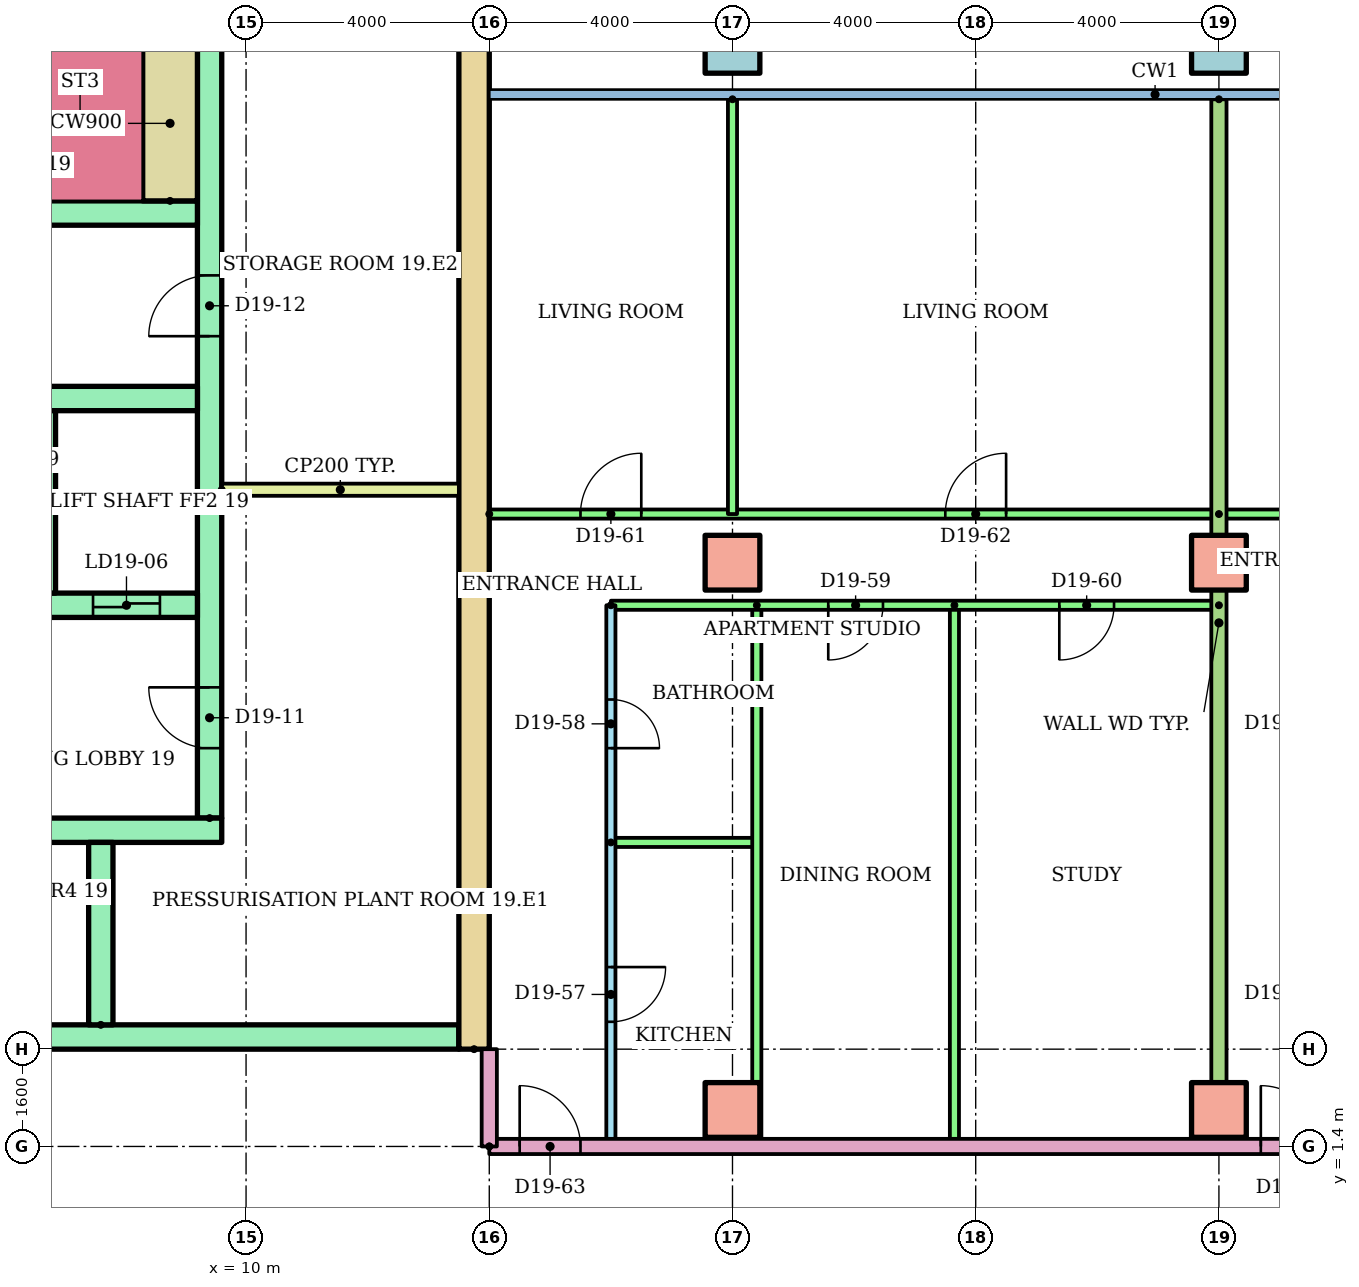
"""IFC4 building model, lengths in metres.
Left out: names, types, materials, properties, quantities, classifications, styles, units other than length and angle.
Written with IfcOpenShell. Run it as: python <this file> out.ifc"""

import sys

from ifc_helpers import new_model, si_unit, direction, frame, frame_2d, origin, origin_2d, place, context, subcontext, project, spatial, rectangle, hollow_rectangle, extrude, element, fill, save


model = new_model("IFC4")
c1 = context("Model", 3, precision=1e-05, world=origin(), true_north=direction((0.0, 1.0)))
c2 = subcontext(c1, "Body", "Model", "MODEL_VIEW")
j1 = project(units=[si_unit("LENGTHUNIT", "METRE"), si_unit("PLANEANGLEUNIT", "RADIAN")], contexts=[c1])
p1 = place(None, origin())
s1 = spatial("IfcSite", under=j1, at=p1, CompositionType="ELEMENT")
p2 = place(p1, origin())
s2 = spatial("IfcBuilding", under=s1, at=p2, CompositionType="ELEMENT")
p3 = place(p2, frame((0.0, 0.0, 77.5)))
s3 = spatial("IfcBuildingStorey", under=s2, at=p3, CompositionType="ELEMENT", Elevation=77.5)
for number, where in (
    (1, (18.0, 2.0, 0.0)),
    (2, (26.0, 2.0, 0.0)),
    (3, (18.0, 11.0, 0.0)),
    (4, (26.0, 11.0, 0.0)),
):
    element("IfcColumn", number, at=place(p3, frame(where)), inside=s3, PredefinedType="COLUMN", context=c2, shape_type="SweptSolid", body=[
        extrude(rectangle(XDim=0.9, YDim=0.9, at=origin_2d()), origin(), (0.0, 0.0, 1.0), 3.2),
    ])
for number, where in (
    (5, (18.0, 19.5, 0.0)),
    (6, (26.0, 19.5, 0.0)),
):
    element("IfcColumn", number, at=place(p3, frame(where)), inside=s3, PredefinedType="COLUMN", context=c2, shape_type="SweptSolid", body=[
        extrude(hollow_rectangle(XDim=0.9, YDim=0.9, WallThickness=0.045, at=origin_2d()), origin(), (0.0, 0.0, 1.0), 3.2),
    ])
p4 = place(p3, frame((13.75, 3.0, 0.0), z_axis=(0.0, 0.0, 1.0), x_axis=(0.0, 1.0, 0.0)))
e7 = element("IfcWall", 7, at=p4, inside=s3, PredefinedType="SHEAR", context=c2, shape_type="SweptSolid", body=[
    extrude(rectangle(XDim=17.0, YDim=0.5, at=frame_2d((8.5, 0.0))), origin(), (0.0, 0.0, 1.0), 2.92),
])
p5 = place(p3, frame((9.4, 6.8, 0.0), z_axis=(0.0, 0.0, 1.0), x_axis=(0.0, 1.0, 0.0)))
e8 = element("IfcWall", 8, at=p5, inside=s3, PredefinedType="SHEAR", context=c2, shape_type="SweptSolid", body=[
    extrude(rectangle(XDim=12.7, YDim=0.4, at=frame_2d((6.35, 0.0))), origin(), (0.0, 0.0, 1.0), 2.92),
])
p6 = place(p5, frame((1.15, 0.0, 0.0)))
e9 = element("IfcOpeningElement", 9, at=p6, cuts=e8, PredefinedType="OPENING", context=c2, shape_type="SweptSolid", body=[
    extrude(rectangle(XDim=1.0, YDim=2.1, at=frame_2d((0.5, 1.05))), frame((0.0, 0.21, 0.0), z_axis=(0.0, -1.0, 0.0), x_axis=(1.0, 0.0, 0.0)), (0.0, 0.0, 1.0), 0.42),
])
p7 = place(p5, frame((7.925, 0.0, 0.0)))
e10 = element("IfcOpeningElement", 10, at=p7, cuts=e8, PredefinedType="OPENING", context=c2, shape_type="SweptSolid", body=[
    extrude(rectangle(XDim=1.0, YDim=2.1, at=frame_2d((0.5, 1.05))), frame((0.0, 0.21, 0.0), z_axis=(0.0, -1.0, 0.0), x_axis=(1.0, 0.0, 0.0)), (0.0, 0.0, 1.0), 0.42),
])
p8 = place(p3, frame((-13.5, 3.2, 0.0)))
e11 = element("IfcWall", 11, at=p8, inside=s3, PredefinedType="SHEAR", context=c2, shape_type="SweptSolid", body=[
    extrude(rectangle(XDim=27.0, YDim=0.4, at=frame_2d((13.5, 0.0))), origin(), (0.0, 0.0, 1.0), 2.92),
])
p9 = place(p8, frame((6.861, 0.0, 0.0)))
e12 = element("IfcOpeningElement", 12, at=p9, cuts=e11, PredefinedType="OPENING", context=c2, shape_type="SweptSolid", body=[
    extrude(rectangle(XDim=1.1, YDim=2.1, at=frame_2d((0.55, 1.05))), frame((0.0, 0.21, 0.0), z_axis=(0.0, -1.0, 0.0), x_axis=(1.0, 0.0, 0.0)), (0.0, 0.0, 1.0), 0.42),
])
p10 = place(p8, frame((9.906, 0.0, 0.0)))
e13 = element("IfcOpeningElement", 13, at=p10, cuts=e11, PredefinedType="OPENING", context=c2, shape_type="SweptSolid", body=[
    extrude(rectangle(XDim=1.1, YDim=2.1, at=frame_2d((0.55, 1.05))), frame((0.0, 0.21, 0.0), z_axis=(0.0, -1.0, 0.0), x_axis=(1.0, 0.0, 0.0)), (0.0, 0.0, 1.0), 0.42),
])
p11 = place(p8, frame((15.994, 0.0, 0.0)))
e14 = element("IfcOpeningElement", 14, at=p11, cuts=e11, PredefinedType="OPENING", context=c2, shape_type="SweptSolid", body=[
    extrude(rectangle(XDim=1.1, YDim=2.1, at=frame_2d((0.55, 1.05))), frame((0.0, 0.21, 0.0), z_axis=(0.0, -1.0, 0.0), x_axis=(1.0, 0.0, 0.0)), (0.0, 0.0, 1.0), 0.42),
])
p12 = place(p8, frame((19.039, 0.0, 0.0)))
e15 = element("IfcOpeningElement", 15, at=p12, cuts=e11, PredefinedType="OPENING", context=c2, shape_type="SweptSolid", body=[
    extrude(rectangle(XDim=1.1, YDim=2.1, at=frame_2d((0.55, 1.05))), frame((0.0, 0.21, 0.0), z_axis=(0.0, -1.0, 0.0), x_axis=(1.0, 0.0, 0.0)), (0.0, 0.0, 1.0), 0.42),
])
p13 = place(p8, frame((12.6, 0.0, 0.0)))
e16 = element("IfcOpeningElement", 16, at=p13, cuts=e11, PredefinedType="OPENING", context=c2, shape_type="SweptSolid", body=[
    extrude(rectangle(XDim=1.8, YDim=2.1, at=frame_2d((0.9, 1.05))), frame((0.0, 0.21, 0.0), z_axis=(0.0, -1.0, 0.0), x_axis=(1.0, 0.0, 0.0)), (0.0, 0.0, 1.0), 0.42),
])
p14 = place(p3, frame((1.522, 6.6, 0.0)))
e17 = element("IfcWall", 17, at=p14, inside=s3, PredefinedType="SHEAR", context=c2, shape_type="SweptSolid", body=[
    extrude(rectangle(XDim=8.078, YDim=0.4, at=frame_2d((4.039, 0.0))), origin(), (0.0, 0.0, 1.0), 2.92),
])
p15 = place(p3, frame((7.611, 3.4, 0.0), z_axis=(0.0, 0.0, 1.0), x_axis=(0.0, 1.0, 0.0)))
e18 = element("IfcWall", 18, at=p15, inside=s3, PredefinedType="SHEAR", context=c2, shape_type="SweptSolid", body=[
    extrude(rectangle(XDim=3.0, YDim=0.4, at=frame_2d((1.5, 0.0))), origin(), (0.0, 0.0, 1.0), 2.92),
])
p16 = place(p3, frame((1.2, 10.3, 0.0)))
e19 = element("IfcWall", 19, at=p16, inside=s3, PredefinedType="SHEAR", context=c2, shape_type="SweptSolid", body=[
    extrude(rectangle(XDim=8.0, YDim=0.4, at=frame_2d((4.0, 0.0))), origin(), (0.0, 0.0, 1.0), 2.92),
])
p17 = place(p16, frame((3.55, 0.0, 0.0)))
e20 = element("IfcOpeningElement", 20, at=p17, cuts=e19, PredefinedType="OPENING", context=c2, shape_type="SweptSolid", body=[
    extrude(rectangle(XDim=1.1, YDim=2.1, at=frame_2d((0.55, 1.05))), frame((0.0, 0.21, 0.0), z_axis=(0.0, -1.0, 0.0), x_axis=(1.0, 0.0, 0.0)), (0.0, 0.0, 1.0), 0.42),
])
p18 = place(p16, frame((6.283, 0.0, 0.0)))
e21 = element("IfcOpeningElement", 21, at=p18, cuts=e19, PredefinedType="OPENING", context=c2, shape_type="SweptSolid", body=[
    extrude(rectangle(XDim=1.1, YDim=2.1, at=frame_2d((0.55, 1.05))), frame((0.0, 0.21, 0.0), z_axis=(0.0, -1.0, 0.0), x_axis=(1.0, 0.0, 0.0)), (0.0, 0.0, 1.0), 0.42),
])
p19 = place(p16, frame((0.867, 0.0, 0.0)))
e22 = element("IfcOpeningElement", 22, at=p19, cuts=e19, PredefinedType="OPENING", context=c2, shape_type="SweptSolid", body=[
    extrude(rectangle(XDim=1.0, YDim=2.1, at=frame_2d((0.5, 1.05))), frame((0.0, 0.21, 0.0), z_axis=(0.0, -1.0, 0.0), x_axis=(1.0, 0.0, 0.0)), (0.0, 0.0, 1.0), 0.42),
])
p20 = place(p3, frame((1.2, 13.7, 0.0)))
e23 = element("IfcWall", 23, at=p20, inside=s3, PredefinedType="SHEAR", context=c2, shape_type="SweptSolid", body=[
    extrude(rectangle(XDim=8.0, YDim=0.4, at=frame_2d((4.0, 0.0))), origin(), (0.0, 0.0, 1.0), 2.92),
])
p21 = place(p3, frame((6.667, 10.5, 0.0), z_axis=(0.0, 0.0, 1.0), x_axis=(0.0, 1.0, 0.0)))
e24 = element("IfcWall", 24, at=p21, inside=s3, PredefinedType="SHEAR", context=c2, shape_type="SweptSolid", body=[
    extrude(rectangle(XDim=3.0, YDim=0.4, at=frame_2d((1.5, 0.0))), origin(), (0.0, 0.0, 1.0), 2.92),
])
p22 = place(p3, frame((-9.2, 16.75, 0.0)))
e25 = element("IfcWall", 25, at=p22, inside=s3, PredefinedType="SHEAR", context=c2, shape_type="SweptSolid", body=[
    extrude(rectangle(XDim=18.4, YDim=0.4, at=frame_2d((9.2, 0.0))), origin(), (0.0, 0.0, 1.0), 2.92),
])
p23 = place(p22, frame((0.1, 0.0, 0.0)))
e26 = element("IfcOpeningElement", 26, at=p23, cuts=e25, PredefinedType="OPENING", context=c2, shape_type="SweptSolid", body=[
    extrude(rectangle(XDim=0.95, YDim=2.1, at=frame_2d((0.475, 1.05))), frame((0.0, 0.21, 0.0), z_axis=(0.0, -1.0, 0.0), x_axis=(1.0, 0.0, 0.0)), (0.0, 0.0, 1.0), 0.42),
])
p24 = place(p22, frame((6.1, 0.0, 0.0)))
e27 = element("IfcOpeningElement", 27, at=p24, cuts=e25, PredefinedType="OPENING", context=c2, shape_type="SweptSolid", body=[
    extrude(rectangle(XDim=0.95, YDim=2.1, at=frame_2d((0.475, 1.05))), frame((0.0, 0.21, 0.0), z_axis=(0.0, -1.0, 0.0), x_axis=(1.0, 0.0, 0.0)), (0.0, 0.0, 1.0), 0.42),
])
p25 = place(p22, frame((12.1, 0.0, 0.0)))
e28 = element("IfcOpeningElement", 28, at=p25, cuts=e25, PredefinedType="OPENING", context=c2, shape_type="SweptSolid", body=[
    extrude(rectangle(XDim=0.95, YDim=2.1, at=frame_2d((0.475, 1.05))), frame((0.0, 0.21, 0.0), z_axis=(0.0, -1.0, 0.0), x_axis=(1.0, 0.0, 0.0)), (0.0, 0.0, 1.0), 0.42),
])
p26 = place(p3, frame((8.75, 16.95, 0.0), z_axis=(0.0, 0.0, 1.0), x_axis=(0.0, 1.0, 0.0)))
e29 = element("IfcWall", 29, at=p26, inside=s3, PredefinedType="SHEAR", context=c2, shape_type="SweptSolid", body=[
    extrude(rectangle(XDim=2.55, YDim=0.9, at=frame_2d((1.275, 0.0))), origin(), (0.0, 0.0, 1.0), 2.92),
])
p27 = place(p3, frame((9.6, 12.2, 0.0)))
e30 = element("IfcWall", 30, at=p27, inside=s3, PredefinedType="PARTITIONING", context=c2, shape_type="SweptSolid", body=[
    extrude(rectangle(XDim=3.9, YDim=0.2, at=frame_2d((1.95, 0.0))), origin(), (0.0, 0.0, 1.0), 2.92),
])
p28 = place(p3, frame((16.0, 10.3, 0.0), z_axis=(0.0, 0.0, 1.0), x_axis=(0.0, -1.0, 0.0)))
e31 = element("IfcWall", 31, at=p28, inside=s3, PredefinedType="PARTITIONING", context=c2, shape_type="SweptSolid", body=[
    extrude(rectangle(XDim=8.9, YDim=0.15, at=frame_2d((4.45, 0.0))), origin(), (0.0, 0.0, 1.0), 2.4),
])
p29 = place(p28, frame((5.95, 0.0, 0.0)))
e32 = element("IfcOpeningElement", 32, at=p29, cuts=e31, PredefinedType="OPENING", context=c2, shape_type="SweptSolid", body=[
    extrude(rectangle(XDim=0.9, YDim=2.1, at=frame_2d((0.45, 1.05))), frame((0.0, 0.085, 0.0), z_axis=(0.0, -1.0, 0.0), x_axis=(1.0, 0.0, 0.0)), (0.0, 0.0, 1.0), 0.17),
])
p30 = place(p28, frame((1.55, 0.0, 0.0)))
e33 = element("IfcOpeningElement", 33, at=p30, cuts=e31, PredefinedType="OPENING", context=c2, shape_type="SweptSolid", body=[
    extrude(rectangle(XDim=0.8, YDim=2.1, at=frame_2d((0.4, 1.05))), frame((0.0, 0.085, 0.0), z_axis=(0.0, -1.0, 0.0), x_axis=(1.0, 0.0, 0.0)), (0.0, 0.0, 1.0), 0.17),
])
p31 = place(p3, frame((16.0, 6.4, 0.0)))
e34 = element("IfcWall", 34, at=p31, inside=s3, PredefinedType="PARTITIONING", context=c2, shape_type="SweptSolid", body=[
    extrude(rectangle(XDim=2.4, YDim=0.15, at=frame_2d((1.2, 0.0))), origin(), (0.0, 0.0, 1.0), 2.4),
])
for number, where, z_axis, x_axis in (
    (35, (18.4, 10.3, 0.0), (0.0, 0.0, 1.0), (0.0, -1.0, 0.0)),
    (36, (21.65, 10.3, 0.0), (0.0, 0.0, 1.0), (0.0, -1.0, 0.0)),
):
    element("IfcWall", number, at=place(p3, frame(where, z_axis=z_axis, x_axis=x_axis)), inside=s3, PredefinedType="PARTITIONING", context=c2, shape_type="SweptSolid", body=[
        extrude(rectangle(XDim=8.9, YDim=0.15, at=frame_2d((4.45, 0.0))), origin(), (0.0, 0.0, 1.0), 2.4),
    ])
p32 = place(p3, frame((26.0, 10.3, 0.0), z_axis=(0.0, 0.0, 1.0), x_axis=(-1.0, 0.0, 0.0)))
e37 = element("IfcWall", 37, at=p32, inside=s3, PredefinedType="PARTITIONING", context=c2, shape_type="SweptSolid", body=[
    extrude(rectangle(XDim=10.0, YDim=0.15, at=frame_2d((5.0, 0.0))), origin(), (0.0, 0.0, 1.0), 2.4),
])
p33 = place(p32, frame((5.525, 0.0, 0.0)))
e38 = element("IfcOpeningElement", 38, at=p33, cuts=e37, PredefinedType="OPENING", context=c2, shape_type="SweptSolid", body=[
    extrude(rectangle(XDim=0.9, YDim=2.1, at=frame_2d((0.45, 1.05))), frame((0.0, 0.085, 0.0), z_axis=(0.0, -1.0, 0.0), x_axis=(1.0, 0.0, 0.0)), (0.0, 0.0, 1.0), 0.17),
])
p34 = place(p32, frame((1.725, 0.0, 0.0)))
e39 = element("IfcOpeningElement", 39, at=p34, cuts=e37, PredefinedType="OPENING", context=c2, shape_type="SweptSolid", body=[
    extrude(rectangle(XDim=0.9, YDim=2.1, at=frame_2d((0.45, 1.05))), frame((0.0, 0.085, 0.0), z_axis=(0.0, -1.0, 0.0), x_axis=(1.0, 0.0, 0.0)), (0.0, 0.0, 1.0), 0.17),
])
p35 = place(p3, frame((14.0, 11.8, 0.0)))
e40 = element("IfcWall", 40, at=p35, inside=s3, PredefinedType="PARTITIONING", context=c2, shape_type="SweptSolid", body=[
    extrude(rectangle(XDim=12.0, YDim=0.15, at=frame_2d((6.0, 0.0))), origin(), (0.0, 0.0, 1.0), 2.4),
])
p36 = place(p35, frame((1.5, 0.0, 0.0)))
e41 = element("IfcOpeningElement", 41, at=p36, cuts=e40, PredefinedType="OPENING", context=c2, shape_type="SweptSolid", body=[
    extrude(rectangle(XDim=1.0, YDim=2.1, at=frame_2d((0.5, 1.05))), frame((0.0, 0.085, 0.0), z_axis=(0.0, -1.0, 0.0), x_axis=(1.0, 0.0, 0.0)), (0.0, 0.0, 1.0), 0.17),
])
p37 = place(p35, frame((7.5, 0.0, 0.0)))
e42 = element("IfcOpeningElement", 42, at=p37, cuts=e40, PredefinedType="OPENING", context=c2, shape_type="SweptSolid", body=[
    extrude(rectangle(XDim=1.0, YDim=2.1, at=frame_2d((0.5, 1.05))), frame((0.0, 0.085, 0.0), z_axis=(0.0, -1.0, 0.0), x_axis=(1.0, 0.0, 0.0)), (0.0, 0.0, 1.0), 0.17),
])
p38 = place(p3, frame((18.0, 18.621, 0.0), z_axis=(0.0, 0.0, 1.0), x_axis=(0.0, -1.0, 0.0)))
e43 = element("IfcWall", 43, at=p38, inside=s3, PredefinedType="PARTITIONING", context=c2, shape_type="SweptSolid", body=[
    extrude(rectangle(XDim=6.821, YDim=0.15, at=frame_2d((3.411, 0.0))), origin(), (0.0, 0.0, 1.0), 2.4),
])
p39 = place(p3, frame((26.0, 11.8, 0.0)))
e44 = element("IfcWall", 44, at=p39, inside=s3, PredefinedType="PARTITIONING", context=c2, shape_type="SweptSolid", body=[
    extrude(rectangle(XDim=14.62, YDim=0.15, at=frame_2d((7.31, 0.0))), origin(), (0.0, 0.0, 1.0), 2.4),
])
p40 = place(p39, frame((3.5, 0.0, 0.0)))
e45 = element("IfcOpeningElement", 45, at=p40, cuts=e44, PredefinedType="OPENING", context=c2, shape_type="SweptSolid", body=[
    extrude(rectangle(XDim=1.0, YDim=2.1, at=frame_2d((0.5, 1.05))), frame((0.0, 0.085, 0.0), z_axis=(0.0, -1.0, 0.0), x_axis=(1.0, 0.0, 0.0)), (0.0, 0.0, 1.0), 0.17),
])
p41 = place(p39, frame((10.7, 0.0, 0.0)))
e46 = element("IfcOpeningElement", 46, at=p41, cuts=e44, PredefinedType="OPENING", context=c2, shape_type="SweptSolid", body=[
    extrude(rectangle(XDim=1.0, YDim=2.1, at=frame_2d((0.5, 1.05))), frame((0.0, 0.085, 0.0), z_axis=(0.0, -1.0, 0.0), x_axis=(1.0, 0.0, 0.0)), (0.0, 0.0, 1.0), 0.17),
])
p42 = place(p3, frame((26.0, 18.621, 0.0), z_axis=(0.0, 0.0, 1.0), x_axis=(0.0, -1.0, 0.0)))
e47 = element("IfcWall", 47, at=p42, inside=s3, PredefinedType="PARTITIONING", context=c2, shape_type="SweptSolid", body=[
    extrude(rectangle(XDim=17.221, YDim=0.25, at=frame_2d((8.611, 0.0))), origin(), (0.0, 0.0, 1.0), 2.4),
])
p43 = place(p3, frame((14.0, 1.4, 0.0)))
e48 = element("IfcWall", 48, at=p43, inside=s3, PredefinedType="PARTITIONING", context=c2, shape_type="SweptSolid", body=[
    extrude(rectangle(XDim=15.0, YDim=0.25, at=frame_2d((7.5, 0.0))), origin(), (0.0, 0.0, 1.0), 2.4),
])
p44 = place(p43, frame((0.5, 0.0, 0.0)))
e49 = element("IfcOpeningElement", 49, at=p44, cuts=e48, PredefinedType="OPENING", context=c2, shape_type="SweptSolid", body=[
    extrude(rectangle(XDim=1.0, YDim=2.1, at=frame_2d((0.5, 1.05))), frame((0.0, 0.135, 0.0), z_axis=(0.0, -1.0, 0.0), x_axis=(1.0, 0.0, 0.0)), (0.0, 0.0, 1.0), 0.27),
])
p45 = place(p43, frame((12.689, 0.0, 0.0)))
e50 = element("IfcOpeningElement", 50, at=p45, cuts=e48, PredefinedType="OPENING", context=c2, shape_type="SweptSolid", body=[
    extrude(rectangle(XDim=1.0, YDim=2.1, at=frame_2d((0.5, 1.05))), frame((0.0, 0.135, 0.0), z_axis=(0.0, -1.0, 0.0), x_axis=(1.0, 0.0, 0.0)), (0.0, 0.0, 1.0), 0.27),
])
p46 = place(p3, frame((14.0, 1.4, 0.0), z_axis=(0.0, 0.0, 1.0), x_axis=(0.0, 1.0, 0.0)))
e51 = element("IfcWall", 51, at=p46, inside=s3, PredefinedType="PARTITIONING", context=c2, shape_type="SweptSolid", body=[
    extrude(rectangle(XDim=1.6, YDim=0.25, at=frame_2d((0.8, 0.0))), origin(), (0.0, 0.0, 1.0), 2.4),
])
p47 = place(p18, origin())
e52 = element("IfcDoor", 52, at=p47, inside=s3, OperationType="SLIDING_TO_LEFT", PredefinedType="DOOR", context=c2, shape_type="SweptSolid", body=[
    extrude(rectangle(XDim=1.1, YDim=2.1, at=frame_2d((0.55, 1.05))), frame((0.0, 0.025, 0.0), z_axis=(0.0, -1.0, 0.0), x_axis=(1.0, 0.0, 0.0)), (0.0, 0.0, 1.0), 0.05),
])
fill(e21, e52)
p48 = place(p6, origin())
e53 = element("IfcDoor", 53, at=p48, inside=s3, OperationType="SINGLE_SWING_RIGHT", PredefinedType="DOOR", context=c2, shape_type="SweptSolid", body=[
    extrude(rectangle(XDim=1.0, YDim=2.1, at=frame_2d((0.5, 1.05))), frame((0.0, 0.025, 0.0), z_axis=(0.0, -1.0, 0.0), x_axis=(1.0, 0.0, 0.0)), (0.0, 0.0, 1.0), 0.05),
])
fill(e9, e53)
p49 = place(p7, origin())
e54 = element("IfcDoor", 54, at=p49, inside=s3, OperationType="SINGLE_SWING_LEFT", PredefinedType="DOOR", context=c2, shape_type="SweptSolid", body=[
    extrude(rectangle(XDim=1.0, YDim=2.1, at=frame_2d((0.5, 1.05))), frame((0.0, 0.025, 0.0), z_axis=(0.0, -1.0, 0.0), x_axis=(1.0, 0.0, 0.0)), (0.0, 0.0, 1.0), 0.05),
])
fill(e10, e54)
p50 = place(p29, origin())
e55 = element("IfcDoor", 55, at=p50, inside=s3, OperationType="SINGLE_SWING_LEFT", PredefinedType="DOOR", context=c2, shape_type="SweptSolid", body=[
    extrude(rectangle(XDim=0.9, YDim=2.1, at=frame_2d((0.45, 1.05))), frame((0.0, 0.025, 0.0), z_axis=(0.0, -1.0, 0.0), x_axis=(1.0, 0.0, 0.0)), (0.0, 0.0, 1.0), 0.05),
])
fill(e32, e55)
p51 = place(p30, origin())
e56 = element("IfcDoor", 56, at=p51, inside=s3, OperationType="SINGLE_SWING_RIGHT", PredefinedType="DOOR", context=c2, shape_type="SweptSolid", body=[
    extrude(rectangle(XDim=0.8, YDim=2.1, at=frame_2d((0.4, 1.05))), frame((0.0, 0.025, 0.0), z_axis=(0.0, -1.0, 0.0), x_axis=(1.0, 0.0, 0.0)), (0.0, 0.0, 1.0), 0.05),
])
fill(e33, e56)
p52 = place(p33, origin())
e57 = element("IfcDoor", 57, at=p52, inside=s3, OperationType="SINGLE_SWING_RIGHT", PredefinedType="DOOR", context=c2, shape_type="SweptSolid", body=[
    extrude(rectangle(XDim=0.9, YDim=2.1, at=frame_2d((0.45, 1.05))), frame((0.0, 0.025, 0.0), z_axis=(0.0, -1.0, 0.0), x_axis=(1.0, 0.0, 0.0)), (0.0, 0.0, 1.0), 0.05),
])
fill(e38, e57)
p53 = place(p34, origin())
e58 = element("IfcDoor", 58, at=p53, inside=s3, OperationType="SINGLE_SWING_RIGHT", PredefinedType="DOOR", context=c2, shape_type="SweptSolid", body=[
    extrude(rectangle(XDim=0.9, YDim=2.1, at=frame_2d((0.45, 1.05))), frame((0.0, 0.025, 0.0), z_axis=(0.0, -1.0, 0.0), x_axis=(1.0, 0.0, 0.0)), (0.0, 0.0, 1.0), 0.05),
])
fill(e39, e58)
p54 = place(p36, origin())
e59 = element("IfcDoor", 59, at=p54, inside=s3, OperationType="SINGLE_SWING_RIGHT", PredefinedType="DOOR", context=c2, shape_type="SweptSolid", body=[
    extrude(rectangle(XDim=1.0, YDim=2.1, at=frame_2d((0.5, 1.05))), frame((0.0, 0.025, 0.0), z_axis=(0.0, -1.0, 0.0), x_axis=(1.0, 0.0, 0.0)), (0.0, 0.0, 1.0), 0.05),
])
fill(e41, e59)
p55 = place(p37, origin())
e60 = element("IfcDoor", 60, at=p55, inside=s3, OperationType="SINGLE_SWING_RIGHT", PredefinedType="DOOR", context=c2, shape_type="SweptSolid", body=[
    extrude(rectangle(XDim=1.0, YDim=2.1, at=frame_2d((0.5, 1.05))), frame((0.0, 0.025, 0.0), z_axis=(0.0, -1.0, 0.0), x_axis=(1.0, 0.0, 0.0)), (0.0, 0.0, 1.0), 0.05),
])
fill(e42, e60)
p56 = place(p44, origin())
e61 = element("IfcDoor", 61, at=p56, inside=s3, OperationType="SINGLE_SWING_LEFT", PredefinedType="DOOR", context=c2, shape_type="SweptSolid", body=[
    extrude(rectangle(XDim=1.0, YDim=2.1, at=frame_2d((0.5, 1.05))), frame((0.0, 0.025, 0.0), z_axis=(0.0, -1.0, 0.0), x_axis=(1.0, 0.0, 0.0)), (0.0, 0.0, 1.0), 0.05),
])
fill(e49, e61)
p57 = place(p45, origin())
e62 = element("IfcDoor", 62, at=p57, inside=s3, OperationType="SINGLE_SWING_LEFT", PredefinedType="DOOR", context=c2, shape_type="SweptSolid", body=[
    extrude(rectangle(XDim=1.0, YDim=2.1, at=frame_2d((0.5, 1.05))), frame((0.0, 0.025, 0.0), z_axis=(0.0, -1.0, 0.0), x_axis=(1.0, 0.0, 0.0)), (0.0, 0.0, 1.0), 0.05),
])
fill(e50, e62)
save(model, sys.argv[1])
